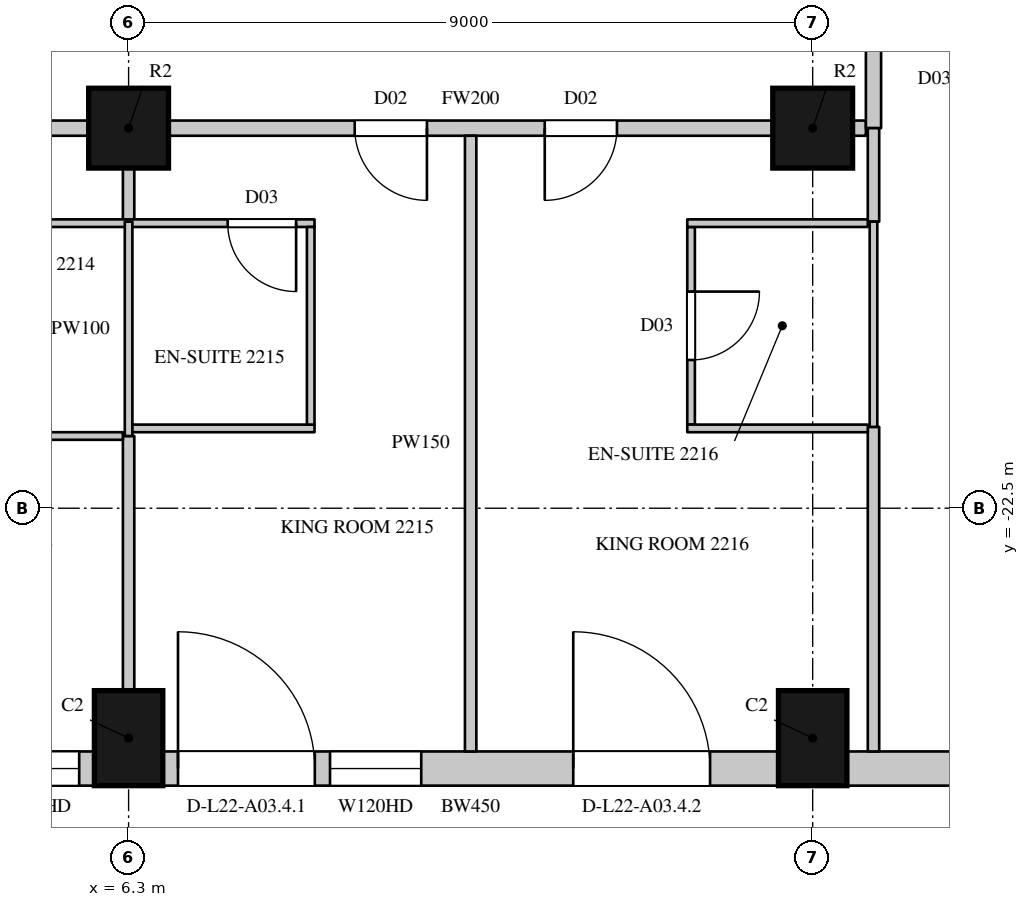
"""IFC4 building model, lengths in metres.
Left out: names, types, materials, properties, quantities, classifications, styles, units other than length and angle.
Written with IfcOpenShell. Run it as: python <this file> out.ifc"""

import sys

from ifc_helpers import new_model, si_unit, direction, frame, frame_2d, origin, origin_2d, place, context, subcontext, project, spatial, rectangle, circle, extrude, element, fill, save


model = new_model("IFC4")
c1 = context("Model", 3, precision=1e-05, world=origin(), true_north=direction((0.0, 1.0)))
c2 = subcontext(c1, "Body", "Model", "MODEL_VIEW")
j1 = project(units=[si_unit("LENGTHUNIT", "METRE"), si_unit("PLANEANGLEUNIT", "RADIAN")], contexts=[c1])
p1 = place(None, origin())
s1 = spatial("IfcSite", under=j1, at=p1, CompositionType="ELEMENT")
p2 = place(p1, origin())
s2 = spatial("IfcBuilding", under=s1, at=p2, CompositionType="ELEMENT")
p3 = place(p2, frame((0.0, 0.0, 109.5)))
s3 = spatial("IfcBuildingStorey", under=s2, at=p3, CompositionType="ELEMENT", Elevation=109.5)
for number, where, z_axis, x_axis in (
    (1, (6.3, -25.525, 0.0), (0.0, 0.0, 1.0), (1.0, 0.0, 0.0)),
    (2, (15.3, -25.525, 0.0), (0.0, 0.0, 1.0), (1.0, 0.0, 0.0)),
):
    element("IfcColumn", number, at=place(p3, frame(where, z_axis=z_axis, x_axis=x_axis)), inside=s3, PredefinedType="COLUMN", context=c2, shape_type="SweptSolid", body=[
        extrude(rectangle(XDim=0.9, YDim=1.25, at=origin_2d()), origin(), (0.0, 0.0, 1.0), 3.6),
    ])
for number, where, z_axis, x_axis in (
    (3, (6.3, -17.5, 0.0), (0.0, 0.0, 1.0), (1.0, 0.0, 0.0)),
    (4, (15.3, -17.5, 0.0), (0.0, 0.0, 1.0), (1.0, 0.0, 0.0)),
):
    element("IfcColumn", number, at=place(p3, frame(where, z_axis=z_axis, x_axis=x_axis)), inside=s3, PredefinedType="COLUMN", context=c2, shape_type="SweptSolid", body=[
        extrude(circle(Radius=0.525, at=origin_2d()), origin(), (0.0, 0.0, 1.0), 3.6),
    ])
p4 = place(p3, frame((-2.25, -25.925, 0.0), z_axis=(0.0, 0.0, 1.0), x_axis=(1.0, 0.0, 0.0)))
e5 = element("IfcWall", 5, at=p4, inside=s3, PredefinedType="SOLIDWALL", context=c2, shape_type="SweptSolid", body=[
    extrude(rectangle(XDim=8.1, YDim=0.45, at=frame_2d((4.05, 0.0))), origin(), (0.0, 0.0, 1.0), 3.3),
])
p5 = place(p4, frame((0.2, 0.0, 0.0)))
e6 = element("IfcOpeningElement", 6, at=p5, cuts=e5, PredefinedType="OPENING", context=c2, shape_type="SweptSolid", body=[
    extrude(rectangle(XDim=1.8, YDim=2.4, at=frame_2d((0.9, 1.2))), frame((0.0, 0.235, 0.0), z_axis=(0.0, -1.0, 0.0), x_axis=(1.0, 0.0, 0.0)), (0.0, 0.0, 1.0), 0.47),
])
p6 = place(p4, frame((2.2, 0.0, 1.05)))
e7 = element("IfcOpeningElement", 7, at=p6, cuts=e5, PredefinedType="OPENING", context=c2, shape_type="SweptSolid", body=[
    extrude(rectangle(XDim=1.2, YDim=2.0, at=frame_2d((0.6, 1.0))), frame((0.0, 0.235, 0.0), z_axis=(0.0, -1.0, 0.0), x_axis=(1.0, 0.0, 0.0)), (0.0, 0.0, 1.0), 0.47),
])
p7 = place(p4, frame((4.7, 0.0, 0.0)))
e8 = element("IfcOpeningElement", 8, at=p7, cuts=e5, PredefinedType="OPENING", context=c2, shape_type="SweptSolid", body=[
    extrude(rectangle(XDim=1.8, YDim=2.4, at=frame_2d((0.9, 1.2))), frame((0.0, 0.235, 0.0), z_axis=(0.0, -1.0, 0.0), x_axis=(1.0, 0.0, 0.0)), (0.0, 0.0, 1.0), 0.47),
])
p8 = place(p4, frame((6.7, 0.0, 1.05)))
e9 = element("IfcOpeningElement", 9, at=p8, cuts=e5, PredefinedType="OPENING", context=c2, shape_type="SweptSolid", body=[
    extrude(rectangle(XDim=1.2, YDim=2.0, at=frame_2d((0.6, 1.0))), frame((0.0, 0.235, 0.0), z_axis=(0.0, -1.0, 0.0), x_axis=(1.0, 0.0, 0.0)), (0.0, 0.0, 1.0), 0.47),
])
p9 = place(p3, frame((6.75, -25.925, 0.0), z_axis=(0.0, 0.0, 1.0), x_axis=(1.0, 0.0, 0.0)))
e10 = element("IfcWall", 10, at=p9, inside=s3, PredefinedType="SOLIDWALL", context=c2, shape_type="SweptSolid", body=[
    extrude(rectangle(XDim=8.1, YDim=0.45, at=frame_2d((4.05, 0.0))), origin(), (0.0, 0.0, 1.0), 3.3),
])
p10 = place(p9, frame((0.2, 0.0, 0.0)))
e11 = element("IfcOpeningElement", 11, at=p10, cuts=e10, PredefinedType="OPENING", context=c2, shape_type="SweptSolid", body=[
    extrude(rectangle(XDim=1.8, YDim=2.4, at=frame_2d((0.9, 1.2))), frame((0.0, 0.235, 0.0), z_axis=(0.0, -1.0, 0.0), x_axis=(1.0, 0.0, 0.0)), (0.0, 0.0, 1.0), 0.47),
])
p11 = place(p9, frame((2.2, 0.0, 1.05)))
e12 = element("IfcOpeningElement", 12, at=p11, cuts=e10, PredefinedType="OPENING", context=c2, shape_type="SweptSolid", body=[
    extrude(rectangle(XDim=1.2, YDim=2.0, at=frame_2d((0.6, 1.0))), frame((0.0, 0.235, 0.0), z_axis=(0.0, -1.0, 0.0), x_axis=(1.0, 0.0, 0.0)), (0.0, 0.0, 1.0), 0.47),
])
p12 = place(p9, frame((5.4, 0.0, 0.0)))
e13 = element("IfcOpeningElement", 13, at=p12, cuts=e10, PredefinedType="OPENING", context=c2, shape_type="SweptSolid", body=[
    extrude(rectangle(XDim=1.8, YDim=2.4, at=frame_2d((0.9, 1.2))), frame((0.0, 0.235, 0.0), z_axis=(0.0, -1.0, 0.0), x_axis=(1.0, 0.0, 0.0)), (0.0, 0.0, 1.0), 0.47),
])
p13 = place(p3, frame((15.75, -25.925, 0.0), z_axis=(0.0, 0.0, 1.0), x_axis=(1.0, 0.0, 0.0)))
e14 = element("IfcWall", 14, at=p13, inside=s3, PredefinedType="SOLIDWALL", context=c2, shape_type="SweptSolid", body=[
    extrude(rectangle(XDim=2.914, YDim=0.45, at=frame_2d((1.457, 0.0))), origin(), (0.0, 0.0, 1.0), 3.3),
])
p14 = place(p3, frame((-2.175, -17.5, 0.0), z_axis=(0.0, 0.0, 1.0), x_axis=(1.0, 0.0, 0.0)))
e15 = element("IfcWall", 15, at=p14, inside=s3, PredefinedType="PARTITIONING", context=c2, shape_type="SweptSolid", body=[
    extrude(rectangle(XDim=7.95, YDim=0.2, at=frame_2d((3.975, 0.0))), origin(), (0.0, 0.0, 1.0), 2.75),
])
p15 = place(p14, frame((1.65, 0.0, 0.0)))
e16 = element("IfcOpeningElement", 16, at=p15, cuts=e15, PredefinedType="OPENING", context=c2, shape_type="SweptSolid", body=[
    extrude(rectangle(XDim=1.1, YDim=2.4, at=frame_2d((0.55, 1.2))), frame((0.0, 0.11, 0.0), z_axis=(0.0, -1.0, 0.0), x_axis=(1.0, 0.0, 0.0)), (0.0, 0.0, 1.0), 0.22),
])
p16 = place(p3, frame((6.825, -17.5, 0.0), z_axis=(0.0, 0.0, 1.0), x_axis=(1.0, 0.0, 0.0)))
e17 = element("IfcWall", 17, at=p16, inside=s3, PredefinedType="PARTITIONING", context=c2, shape_type="SweptSolid", body=[
    extrude(rectangle(XDim=7.95, YDim=0.2, at=frame_2d((3.975, 0.0))), origin(), (0.0, 0.0, 1.0), 2.75),
])
p17 = place(p16, frame((2.45, 0.0, 0.0)))
e18 = element("IfcOpeningElement", 18, at=p17, cuts=e17, PredefinedType="OPENING", context=c2, shape_type="SweptSolid", body=[
    extrude(rectangle(XDim=0.95, YDim=2.2, at=frame_2d((0.475, 1.1))), frame((0.0, 0.11, 0.0), z_axis=(0.0, -1.0, 0.0), x_axis=(1.0, 0.0, 0.0)), (0.0, 0.0, 1.0), 0.22),
])
p18 = place(p16, frame((4.95, 0.0, 0.0)))
e19 = element("IfcOpeningElement", 19, at=p18, cuts=e17, PredefinedType="OPENING", context=c2, shape_type="SweptSolid", body=[
    extrude(rectangle(XDim=0.95, YDim=2.2, at=frame_2d((0.475, 1.1))), frame((0.0, 0.11, 0.0), z_axis=(0.0, -1.0, 0.0), x_axis=(1.0, 0.0, 0.0)), (0.0, 0.0, 1.0), 0.22),
])
p19 = place(p3, frame((15.825, -17.5, 0.0), z_axis=(0.0, 0.0, 1.0), x_axis=(1.0, 0.0, 0.0)))
e20 = element("IfcWall", 20, at=p19, inside=s3, PredefinedType="PARTITIONING", context=c2, shape_type="SweptSolid", body=[
    extrude(rectangle(XDim=0.175, YDim=0.2, at=frame_2d((0.087, 0.0))), origin(), (0.0, 0.0, 1.0), 3.3),
])
p20 = place(p3, frame((16.1, -17.5, 0.0), z_axis=(0.0, 0.0, 1.0), x_axis=(0.0, 1.0, 0.0)))
e21 = element("IfcWall", 21, at=p20, inside=s3, PredefinedType="PARTITIONING", context=c2, shape_type="SweptSolid", body=[
    extrude(rectangle(XDim=12.75, YDim=0.2, at=frame_2d((6.375, 0.0))), origin(), (0.0, 0.0, 1.0), 3.3),
])
p21 = place(p20, frame((2.75, 0.0, 0.0)))
e22 = element("IfcOpeningElement", 22, at=p21, cuts=e21, PredefinedType="OPENING", context=c2, shape_type="SweptSolid", body=[
    extrude(rectangle(XDim=0.95, YDim=2.2, at=frame_2d((0.475, 1.1))), frame((0.0, 0.11, 0.0), z_axis=(0.0, -1.0, 0.0), x_axis=(1.0, 0.0, 0.0)), (0.0, 0.0, 1.0), 0.22),
])
p22 = place(p20, frame((6.95, 0.0, 0.0)))
e23 = element("IfcOpeningElement", 23, at=p22, cuts=e21, PredefinedType="OPENING", context=c2, shape_type="SweptSolid", body=[
    extrude(rectangle(XDim=0.95, YDim=2.2, at=frame_2d((0.475, 1.1))), frame((0.0, 0.11, 0.0), z_axis=(0.0, -1.0, 0.0), x_axis=(1.0, 0.0, 0.0)), (0.0, 0.0, 1.0), 0.22),
])
p23 = place(p20, frame((11.4, 0.0, 0.0)))
e24 = element("IfcOpeningElement", 24, at=p23, cuts=e21, PredefinedType="OPENING", context=c2, shape_type="SweptSolid", body=[
    extrude(rectangle(XDim=0.95, YDim=2.2, at=frame_2d((0.475, 1.1))), frame((0.0, 0.11, 0.0), z_axis=(0.0, -1.0, 0.0), x_axis=(1.0, 0.0, 0.0)), (0.0, 0.0, 1.0), 0.22),
])
p24 = place(p3, frame((6.3, -24.9, 0.0), z_axis=(0.0, 0.0, 1.0), x_axis=(0.0, 1.0, 0.0)))
e25 = element("IfcWall", 25, at=p24, inside=s3, PredefinedType="PARTITIONING", context=c2, shape_type="SweptSolid", body=[
    extrude(rectangle(XDim=3.35, YDim=0.15, at=frame_2d((1.675, 0.0))), origin(), (0.0, 0.0, 1.0), 2.75),
])
p25 = place(p3, frame((6.3, -18.73, 0.0), z_axis=(0.0, 0.0, 1.0), x_axis=(0.0, 1.0, 0.0)))
e26 = element("IfcWall", 26, at=p25, inside=s3, PredefinedType="PARTITIONING", context=c2, shape_type="SweptSolid", body=[
    extrude(rectangle(XDim=0.705, YDim=0.15, at=frame_2d((0.353, 0.0))), origin(), (0.0, 0.0, 1.0), 2.75),
])
p26 = place(p3, frame((10.8, -25.7, 0.0), z_axis=(0.0, 0.0, 1.0), x_axis=(0.0, 1.0, 0.0)))
e27 = element("IfcWall", 27, at=p26, inside=s3, PredefinedType="PARTITIONING", context=c2, shape_type="SweptSolid", body=[
    extrude(rectangle(XDim=8.1, YDim=0.15, at=frame_2d((4.05, 0.0))), origin(), (0.0, 0.0, 1.0), 2.65),
])
p27 = place(p3, frame((16.1, -25.7, 0.0), z_axis=(0.0, 0.0, 1.0), x_axis=(0.0, 1.0, 0.0)))
e28 = element("IfcWall", 28, at=p27, inside=s3, PredefinedType="PARTITIONING", context=c2, shape_type="SweptSolid", body=[
    extrude(rectangle(XDim=4.27, YDim=0.15, at=frame_2d((2.135, 0.0))), origin(), (0.0, 0.0, 1.0), 3.3),
])
p28 = place(p3, frame((16.1, -18.73, 0.0), z_axis=(0.0, 0.0, 1.0), x_axis=(0.0, 1.0, 0.0)))
e29 = element("IfcWall", 29, at=p28, inside=s3, PredefinedType="PARTITIONING", context=c2, shape_type="SweptSolid", body=[
    extrude(rectangle(XDim=1.23, YDim=0.15, at=frame_2d((0.615, 0.0))), origin(), (0.0, 0.0, 1.0), 3.3),
])
p29 = place(p3, frame((3.654, -21.55, 0.0), z_axis=(0.0, 0.0, 1.0), x_axis=(1.0, 0.0, 0.0)))
e30 = element("IfcWall", 30, at=p29, inside=s3, PredefinedType="PARTITIONING", context=c2, shape_type="SweptSolid", body=[
    extrude(rectangle(XDim=2.571, YDim=0.1, at=frame_2d((1.286, 0.0))), origin(), (0.0, 0.0, 1.0), 3.3),
])
p30 = place(p3, frame((3.654, -18.75, 0.0), z_axis=(0.0, 0.0, 1.0), x_axis=(1.0, 0.0, 0.0)))
e31 = element("IfcWall", 31, at=p30, inside=s3, PredefinedType="PARTITIONING", context=c2, shape_type="SweptSolid", body=[
    extrude(rectangle(XDim=5.092, YDim=0.1, at=frame_2d((2.546, 0.0))), origin(), (0.0, 0.0, 1.0), 3.3),
])
p31 = place(p30, frame((3.95, 0.0, 0.0)))
e32 = element("IfcOpeningElement", 32, at=p31, cuts=e31, PredefinedType="OPENING", context=c2, shape_type="SweptSolid", body=[
    extrude(rectangle(XDim=0.9, YDim=2.2, at=frame_2d((0.45, 1.1))), frame((0.0, 0.06, 0.0), z_axis=(0.0, -1.0, 0.0), x_axis=(1.0, 0.0, 0.0)), (0.0, 0.0, 1.0), 0.12),
])
p32 = place(p3, frame((6.3, -21.55, 0.0), z_axis=(0.0, 0.0, 1.0), x_axis=(0.0, 1.0, 0.0)))
e33 = element("IfcWall", 33, at=p32, inside=s3, PredefinedType="PARTITIONING", context=c2, shape_type="SweptSolid", body=[
    extrude(rectangle(XDim=2.82, YDim=0.1, at=frame_2d((1.41, 0.0))), origin(), (0.0, 0.0, 1.0), 2.75),
])
p33 = place(p3, frame((6.35, -21.45, 0.0), z_axis=(0.0, 0.0, 1.0), x_axis=(1.0, 0.0, 0.0)))
e34 = element("IfcWall", 34, at=p33, inside=s3, PredefinedType="PARTITIONING", context=c2, shape_type="SweptSolid", body=[
    extrude(rectangle(XDim=2.396, YDim=0.1, at=frame_2d((1.198, 0.0))), origin(), (0.0, 0.0, 1.0), 3.3),
])
p34 = place(p3, frame((8.696, -21.4, 0.0), z_axis=(0.0, 0.0, 1.0), x_axis=(0.0, 1.0, 0.0)))
e35 = element("IfcWall", 35, at=p34, inside=s3, PredefinedType="PARTITIONING", context=c2, shape_type="SweptSolid", body=[
    extrude(rectangle(XDim=2.6, YDim=0.1, at=frame_2d((1.3, 0.0))), origin(), (0.0, 0.0, 1.0), 3.3),
])
p35 = place(p3, frame((13.7, -21.4, 0.0), z_axis=(0.0, 0.0, 1.0), x_axis=(0.0, 1.0, 0.0)))
e36 = element("IfcWall", 36, at=p35, inside=s3, PredefinedType="PARTITIONING", context=c2, shape_type="SweptSolid", body=[
    extrude(rectangle(XDim=2.6, YDim=0.1, at=frame_2d((1.3, 0.0))), origin(), (0.0, 0.0, 1.0), 3.3),
])
p36 = place(p35, frame((0.85, 0.0, 0.0)))
e37 = element("IfcOpeningElement", 37, at=p36, cuts=e36, PredefinedType="OPENING", context=c2, shape_type="SweptSolid", body=[
    extrude(rectangle(XDim=0.9, YDim=2.2, at=frame_2d((0.45, 1.1))), frame((0.0, 0.06, 0.0), z_axis=(0.0, -1.0, 0.0), x_axis=(1.0, 0.0, 0.0)), (0.0, 0.0, 1.0), 0.12),
])
for number, where, z_axis, x_axis in (
    (38, (13.65, -21.45, 0.0), (0.0, 0.0, 1.0), (1.0, 0.0, 0.0)),
    (39, (13.65, -18.75, 0.0), (0.0, 0.0, 1.0), (1.0, 0.0, 0.0)),
):
    element("IfcWall", number, at=place(p3, frame(where, z_axis=z_axis, x_axis=x_axis)), inside=s3, PredefinedType="PARTITIONING", context=c2, shape_type="SweptSolid", body=[
        extrude(rectangle(XDim=2.375, YDim=0.1, at=frame_2d((1.188, 0.0))), origin(), (0.0, 0.0, 1.0), 3.3),
    ])
p37 = place(p3, frame((16.1, -21.43, 0.0), z_axis=(0.0, 0.0, 1.0), x_axis=(0.0, 1.0, 0.0)))
e40 = element("IfcWall", 40, at=p37, inside=s3, PredefinedType="PARTITIONING", context=c2, shape_type="SweptSolid", body=[
    extrude(rectangle(XDim=2.7, YDim=0.1, at=frame_2d((1.35, 0.0))), origin(), (0.0, 0.0, 1.0), 3.3),
])
p38 = place(p8, origin())
e41 = element("IfcWindow", 41, at=p38, inside=s3, PartitioningType="SINGLE_PANEL", PredefinedType="WINDOW", context=c2, shape_type="SweptSolid", body=[
    extrude(rectangle(XDim=1.2, YDim=2.0, at=frame_2d((0.6, 1.0))), frame((0.0, 0.135, 0.0), z_axis=(0.0, -1.0, 0.0), x_axis=(1.0, 0.0, 0.0)), (0.0, 0.0, 1.0), 0.06),
])
fill(e9, e41)
p39 = place(p10, origin())
e42 = element("IfcDoor", 42, at=p39, inside=s3, OperationType="SLIDING_TO_LEFT", PredefinedType="DOOR", context=c2, shape_type="SweptSolid", body=[
    extrude(rectangle(XDim=1.8, YDim=2.4, at=frame_2d((0.9, 1.2))), frame((0.0, 0.13, 0.0), z_axis=(0.0, -1.0, 0.0), x_axis=(1.0, 0.0, 0.0)), (0.0, 0.0, 1.0), 0.05),
])
fill(e11, e42)
p40 = place(p11, origin())
e43 = element("IfcWindow", 43, at=p40, inside=s3, PartitioningType="SINGLE_PANEL", PredefinedType="WINDOW", context=c2, shape_type="SweptSolid", body=[
    extrude(rectangle(XDim=1.2, YDim=2.0, at=frame_2d((0.6, 1.0))), frame((0.0, 0.135, 0.0), z_axis=(0.0, -1.0, 0.0), x_axis=(1.0, 0.0, 0.0)), (0.0, 0.0, 1.0), 0.06),
])
fill(e12, e43)
p41 = place(p12, origin())
e44 = element("IfcDoor", 44, at=p41, inside=s3, OperationType="SLIDING_TO_LEFT", PredefinedType="DOOR", context=c2, shape_type="SweptSolid", body=[
    extrude(rectangle(XDim=1.8, YDim=2.4, at=frame_2d((0.9, 1.2))), frame((0.0, 0.13, 0.0), z_axis=(0.0, -1.0, 0.0), x_axis=(1.0, 0.0, 0.0)), (0.0, 0.0, 1.0), 0.05),
])
fill(e13, e44)
p42 = place(p17, origin())
e45 = element("IfcDoor", 45, at=p42, inside=s3, OperationType="SINGLE_SWING_LEFT", PredefinedType="DOOR", context=c2, shape_type="SweptSolid", body=[
    extrude(rectangle(XDim=0.95, YDim=2.2, at=frame_2d((0.475, 1.1))), frame((0.0, 0.025, 0.0), z_axis=(0.0, -1.0, 0.0), x_axis=(1.0, 0.0, 0.0)), (0.0, 0.0, 1.0), 0.05),
])
fill(e18, e45)
p43 = place(p31, origin())
e46 = element("IfcDoor", 46, at=p43, inside=s3, OperationType="SINGLE_SWING_LEFT", PredefinedType="DOOR", context=c2, shape_type="SweptSolid", body=[
    extrude(rectangle(XDim=0.9, YDim=2.2, at=frame_2d((0.45, 1.1))), frame((0.0, 0.025, 0.0), z_axis=(0.0, -1.0, 0.0), x_axis=(1.0, 0.0, 0.0)), (0.0, 0.0, 1.0), 0.05),
])
fill(e32, e46)
p44 = place(p18, origin())
e47 = element("IfcDoor", 47, at=p44, inside=s3, OperationType="SINGLE_SWING_RIGHT", PredefinedType="DOOR", context=c2, shape_type="SweptSolid", body=[
    extrude(rectangle(XDim=0.95, YDim=2.2, at=frame_2d((0.475, 1.1))), frame((0.0, 0.025, 0.0), z_axis=(0.0, -1.0, 0.0), x_axis=(1.0, 0.0, 0.0)), (0.0, 0.0, 1.0), 0.05),
])
fill(e19, e47)
p45 = place(p36, origin())
e48 = element("IfcDoor", 48, at=p45, inside=s3, OperationType="SINGLE_SWING_LEFT", PredefinedType="DOOR", context=c2, shape_type="SweptSolid", body=[
    extrude(rectangle(XDim=0.9, YDim=2.2, at=frame_2d((0.45, 1.1))), frame((0.0, 0.025, 0.0), z_axis=(0.0, -1.0, 0.0), x_axis=(1.0, 0.0, 0.0)), (0.0, 0.0, 1.0), 0.05),
])
fill(e37, e48)
save(model, sys.argv[1])
